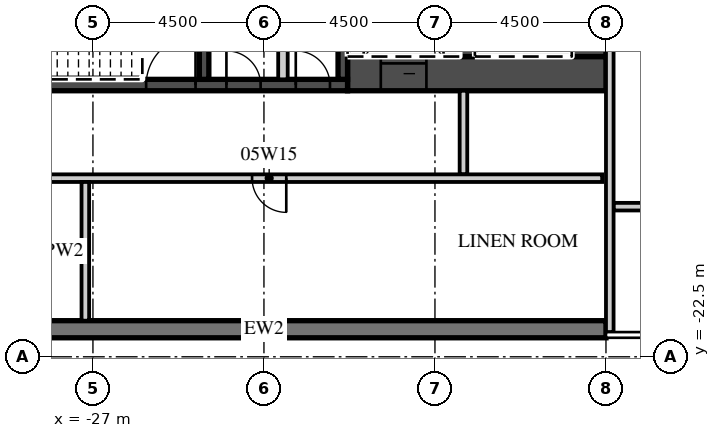
"""IFC4 building model, lengths in metres.
Left out: names, types, materials, properties, quantities, classifications, styles, units other than length and angle.
Written with IfcOpenShell. Run it as: python <this file> out.ifc"""

import sys

from ifc_helpers import new_model, si_unit, direction, frame, frame_2d, origin, place, context, subcontext, project, spatial, rectangle, extrude, element, fill, save


model = new_model("IFC4")
c1 = context("Model", 3, precision=1e-05, world=origin(), true_north=direction((0.0, 1.0)))
c2 = subcontext(c1, "Body", "Model", "MODEL_VIEW")
j1 = project(units=[si_unit("LENGTHUNIT", "METRE"), si_unit("PLANEANGLEUNIT", "RADIAN")], contexts=[c1])
p1 = place(None, origin())
s1 = spatial("IfcSite", under=j1, at=p1, CompositionType="ELEMENT")
p2 = place(p1, origin())
s2 = spatial("IfcBuilding", under=s1, at=p2, CompositionType="ELEMENT")
p3 = place(p2, frame((0.0, 0.0, 33.5)))
s3 = spatial("IfcBuildingStorey", under=s2, at=p3, CompositionType="ELEMENT", Elevation=33.5)
p4 = place(p3, frame((-31.5, -21.775, 0.0), z_axis=(0.0, 0.0, 1.0), x_axis=(1.0, 0.0, 0.0)))
e1 = element("IfcWall", 1, at=p4, inside=s3, PredefinedType="SOLIDWALL", context=c2, shape_type="SweptSolid", body=[
    extrude(rectangle(XDim=18.0, YDim=0.45, at=frame_2d((9.0, 0.0))), origin(), (0.0, 0.0, 1.0), 4.05),
])
p5 = place(p3, frame((-20.3, -15.05, 0.0), z_axis=(0.0, 0.0, 1.0), x_axis=(1.0, 0.0, 0.0)))
e2 = element("IfcWall", 2, at=p5, inside=s3, PredefinedType="SHEAR", context=c2, shape_type="SweptSolid", body=[
    extrude(rectangle(XDim=6.8, YDim=0.9, at=frame_2d((3.4, 0.0))), origin(), (0.0, 0.0, 1.0), 4.05),
])
p6 = place(p5, frame((0.875, 0.0, 0.0)))
e3 = element("IfcOpeningElement", 3, at=p6, cuts=e2, PredefinedType="OPENING", context=c2, shape_type="SweptSolid", body=[
    extrude(rectangle(XDim=1.2, YDim=2.1, at=frame_2d((0.6, 1.05))), frame((0.0, 0.46, 0.0), z_axis=(0.0, -1.0, 0.0), x_axis=(1.0, 0.0, 0.0)), (0.0, 0.0, 1.0), 0.92),
])
p7 = place(p3, frame((-30.6, -15.35, 0.0), z_axis=(0.0, 0.0, 1.0), x_axis=(1.0, 0.0, 0.0)))
e4 = element("IfcWall", 4, at=p7, inside=s3, PredefinedType="SHEAR", context=c2, shape_type="SweptSolid", body=[
    extrude(rectangle(XDim=10.3, YDim=0.3, at=frame_2d((5.15, 0.0))), origin(), (0.0, 0.0, 1.0), 4.05),
])
p8 = place(p7, frame((5.0, 0.0, 0.0)))
e5 = element("IfcOpeningElement", 5, at=p8, cuts=e4, PredefinedType="OPENING", context=c2, shape_type="SweptSolid", body=[
    extrude(rectangle(XDim=1.3, YDim=2.1, at=frame_2d((0.65, 1.05))), frame((0.0, 0.16, 0.0), z_axis=(0.0, -1.0, 0.0), x_axis=(1.0, 0.0, 0.0)), (0.0, 0.0, 1.0), 0.32),
])
p9 = place(p7, frame((7.113, 0.0, 0.0)))
e6 = element("IfcOpeningElement", 6, at=p9, cuts=e4, PredefinedType="OPENING", context=c2, shape_type="SweptSolid", body=[
    extrude(rectangle(XDim=0.9, YDim=2.1, at=frame_2d((0.45, 1.05))), frame((0.0, 0.16, 0.0), z_axis=(0.0, -1.0, 0.0), x_axis=(1.0, 0.0, 0.0)), (0.0, 0.0, 1.0), 0.32),
])
p10 = place(p7, frame((8.938, 0.0, 0.0)))
e7 = element("IfcOpeningElement", 7, at=p10, cuts=e4, PredefinedType="OPENING", context=c2, shape_type="SweptSolid", body=[
    extrude(rectangle(XDim=0.9, YDim=2.1, at=frame_2d((0.45, 1.05))), frame((0.0, 0.16, 0.0), z_axis=(0.0, -1.0, 0.0), x_axis=(1.0, 0.0, 0.0)), (0.0, 0.0, 1.0), 0.32),
])
p11 = place(p3, frame((-13.95, -14.6, 0.0), z_axis=(0.0, 0.0, 1.0), x_axis=(0.0, 1.0, 0.0)))
e8 = element("IfcWall", 8, at=p11, inside=s3, PredefinedType="SHEAR", context=c2, shape_type="SweptSolid", body=[
    extrude(rectangle(XDim=12.2, YDim=0.9, at=frame_2d((6.1, 0.0))), origin(), (0.0, 0.0, 1.0), 4.05),
])
p12 = place(p3, frame((-17.15, -14.6, 0.0), z_axis=(0.0, 0.0, 1.0), x_axis=(0.0, 1.0, 0.0)))
e9 = element("IfcWall", 9, at=p12, inside=s3, PredefinedType="SHEAR", context=c2, shape_type="SweptSolid", body=[
    extrude(rectangle(XDim=5.8, YDim=0.4, at=frame_2d((2.9, 0.0))), origin(), (0.0, 0.0, 1.0), 4.05),
])
for number, where, z_axis, x_axis in (
    (10, (-20.425, -15.2, 0.0), (0.0, 0.0, 1.0), (0.0, 1.0, 0.0)),
    (11, (-24.075, -15.2, 0.0), (0.0, 0.0, 1.0), (0.0, 1.0, 0.0)),
):
    element("IfcWall", number, at=place(p3, frame(where, z_axis=z_axis, x_axis=x_axis)), inside=s3, PredefinedType="SHEAR", context=c2, shape_type="SweptSolid", body=[
        extrude(rectangle(XDim=3.25, YDim=0.25, at=frame_2d((1.625, 0.0))), origin(), (0.0, 0.0, 1.0), 4.05),
    ])
p13 = place(p3, frame((-22.0, -15.2, 0.0), z_axis=(0.0, 0.0, 1.0), x_axis=(0.0, 1.0, 0.0)))
e12 = element("IfcWall", 12, at=p13, inside=s3, PredefinedType="PARTITIONING", context=c2, shape_type="SweptSolid", body=[
    extrude(rectangle(XDim=3.25, YDim=0.25, at=frame_2d((1.625, 0.0))), origin(), (0.0, 0.0, 1.0), 4.05),
])
p14 = place(p3, frame((-17.25, -17.7, 0.0), z_axis=(0.0, 0.0, 1.0), x_axis=(0.0, 1.0, 0.0)))
e13 = element("IfcWall", 13, at=p14, inside=s3, PredefinedType="PARTITIONING", context=c2, shape_type="SweptSolid", body=[
    extrude(rectangle(XDim=2.2, YDim=0.2, at=frame_2d((1.1, 0.0))), origin(), (0.0, 0.0, 1.0), 4.05),
])
p15 = place(p3, frame((-44.55, -17.8, 0.0), z_axis=(0.0, 0.0, 1.0), x_axis=(1.0, 0.0, 0.0)))
e14 = element("IfcWall", 14, at=p15, inside=s3, PredefinedType="PARTITIONING", context=c2, shape_type="SweptSolid", body=[
    extrude(rectangle(XDim=30.95, YDim=0.2, at=frame_2d((15.475, 0.0))), origin(), (0.0, 0.0, 1.0), 4.05),
])
p16 = place(p15, frame((13.438, 0.0, 0.0)))
e15 = element("IfcOpeningElement", 15, at=p16, cuts=e14, PredefinedType="OPENING", context=c2, shape_type="SweptSolid", body=[
    extrude(rectangle(XDim=0.9, YDim=2.1, at=frame_2d((0.45, 1.05))), frame((0.0, 0.11, 0.0), z_axis=(0.0, -1.0, 0.0), x_axis=(1.0, 0.0, 0.0)), (0.0, 0.0, 1.0), 0.22),
])
p17 = place(p15, frame((21.738, 0.0, 0.0)))
e16 = element("IfcOpeningElement", 16, at=p17, cuts=e14, PredefinedType="OPENING", context=c2, shape_type="SweptSolid", body=[
    extrude(rectangle(XDim=0.9, YDim=2.1, at=frame_2d((0.45, 1.05))), frame((0.0, 0.11, 0.0), z_axis=(0.0, -1.0, 0.0), x_axis=(1.0, 0.0, 0.0)), (0.0, 0.0, 1.0), 0.22),
])
p18 = place(p3, frame((-27.2, -21.55, 0.0), z_axis=(0.0, 0.0, 1.0), x_axis=(0.0, 1.0, 0.0)))
e17 = element("IfcWall", 17, at=p18, inside=s3, PredefinedType="PARTITIONING", context=c2, shape_type="SweptSolid", body=[
    extrude(rectangle(XDim=3.65, YDim=0.2, at=frame_2d((1.825, 0.0))), origin(), (0.0, 0.0, 1.0), 4.05),
])
p19 = place(p3, frame((-13.3, -18.55, 0.0), z_axis=(0.0, 0.0, 1.0), x_axis=(1.0, 0.0, 0.0)))
e18 = element("IfcWall", 18, at=p19, inside=s3, PredefinedType="PARTITIONING", context=c2, shape_type="SweptSolid", body=[
    extrude(rectangle(XDim=8.7, YDim=0.2, at=frame_2d((4.35, 0.0))), origin(), (0.0, 0.0, 1.0), 4.05),
])
p20 = place(p19, frame((1.35, 0.0, 0.0)))
e19 = element("IfcOpeningElement", 19, at=p20, cuts=e18, PredefinedType="OPENING", context=c2, shape_type="SweptSolid", body=[
    extrude(rectangle(XDim=0.9, YDim=2.1, at=frame_2d((0.45, 1.05))), frame((0.0, 0.11, 0.0), z_axis=(0.0, -1.0, 0.0), x_axis=(1.0, 0.0, 0.0)), (0.0, 0.0, 1.0), 0.22),
])
p21 = place(p3, frame((-13.4, -21.85, 0.0), z_axis=(0.0, 0.0, 1.0), x_axis=(0.0, 1.0, 0.0)))
e20 = element("IfcWall", 20, at=p21, inside=s3, PredefinedType="PARTITIONING", context=c2, shape_type="SweptSolid", body=[
    extrude(rectangle(XDim=20.15, YDim=0.2, at=frame_2d((10.075, 0.0))), origin(), (0.0, 0.0, 1.0), 4.05),
])
p22 = place(p6, origin())
e21 = element("IfcDoor", 21, at=p22, inside=s3, OperationType="SLIDING_TO_LEFT", PredefinedType="DOOR", context=c2, shape_type="SweptSolid", body=[
    extrude(rectangle(XDim=1.2, YDim=2.1, at=frame_2d((0.6, 1.05))), frame((0.0, 0.025, 0.0), z_axis=(0.0, -1.0, 0.0), x_axis=(1.0, 0.0, 0.0)), (0.0, 0.0, 1.0), 0.05),
])
fill(e3, e21)
p23 = place(p8, origin())
e22 = element("IfcDoor", 22, at=p23, inside=s3, OperationType="SINGLE_SWING_RIGHT", PredefinedType="DOOR", context=c2, shape_type="SweptSolid", body=[
    extrude(rectangle(XDim=1.3, YDim=2.1, at=frame_2d((0.65, 1.05))), frame((0.0, 0.025, 0.0), z_axis=(0.0, -1.0, 0.0), x_axis=(1.0, 0.0, 0.0)), (0.0, 0.0, 1.0), 0.05),
])
fill(e5, e22)
p24 = place(p9, origin())
e23 = element("IfcDoor", 23, at=p24, inside=s3, OperationType="SINGLE_SWING_LEFT", PredefinedType="DOOR", context=c2, shape_type="SweptSolid", body=[
    extrude(rectangle(XDim=0.9, YDim=2.1, at=frame_2d((0.45, 1.05))), frame((0.0, 0.025, 0.0), z_axis=(0.0, -1.0, 0.0), x_axis=(1.0, 0.0, 0.0)), (0.0, 0.0, 1.0), 0.05),
])
fill(e6, e23)
p25 = place(p10, origin())
e24 = element("IfcDoor", 24, at=p25, inside=s3, OperationType="SINGLE_SWING_LEFT", PredefinedType="DOOR", context=c2, shape_type="SweptSolid", body=[
    extrude(rectangle(XDim=0.9, YDim=2.1, at=frame_2d((0.45, 1.05))), frame((0.0, 0.025, 0.0), z_axis=(0.0, -1.0, 0.0), x_axis=(1.0, 0.0, 0.0)), (0.0, 0.0, 1.0), 0.05),
])
fill(e7, e24)
p26 = place(p17, origin())
e25 = element("IfcDoor", 25, at=p26, inside=s3, OperationType="SINGLE_SWING_RIGHT", PredefinedType="DOOR", context=c2, shape_type="SweptSolid", body=[
    extrude(rectangle(XDim=0.9, YDim=2.1, at=frame_2d((0.45, 1.05))), frame((0.0, 0.025, 0.0), z_axis=(0.0, -1.0, 0.0), x_axis=(1.0, 0.0, 0.0)), (0.0, 0.0, 1.0), 0.05),
])
fill(e16, e25)
save(model, sys.argv[1])
